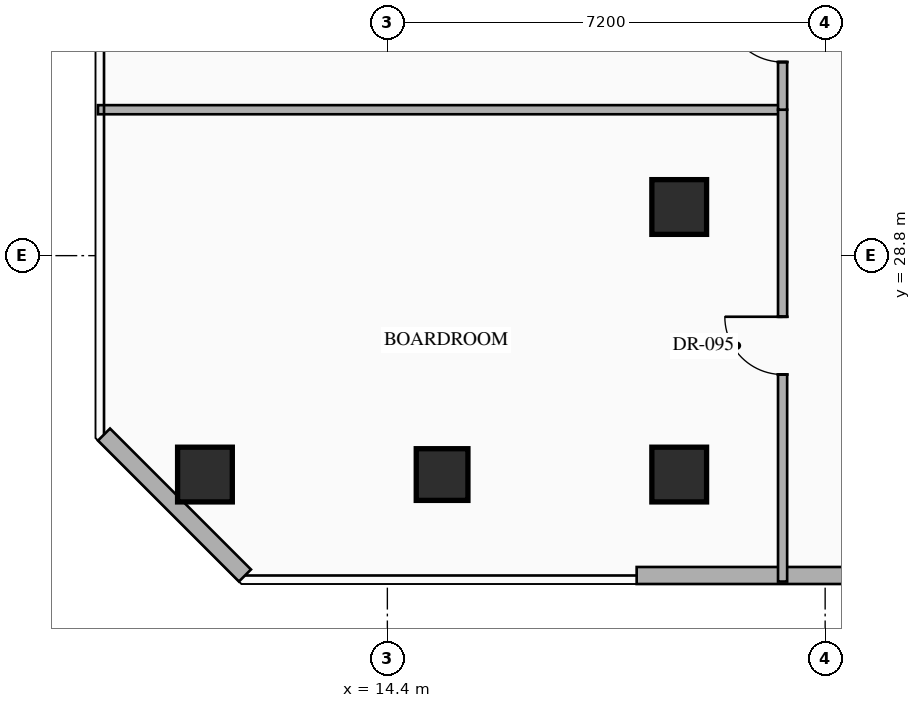
"""IFC4 building model, lengths in metres.
Left out: names, types, materials, properties, quantities, classifications, styles, units other than length and angle.
Written with IfcOpenShell. Run it as: python <this file> out.ifc"""

import sys

from ifc_helpers import new_model, si_unit, direction, frame, frame_2d, origin, origin_2d, place, context, subcontext, project, spatial, rectangle, hollow_rectangle, extrude, element, fill, save


model = new_model("IFC4")
c1 = context("Model", 3, precision=1e-05, world=origin(), true_north=direction((0.0, 1.0)))
c2 = subcontext(c1, "Body", "Model", "MODEL_VIEW")
j1 = project(units=[si_unit("LENGTHUNIT", "METRE"), si_unit("PLANEANGLEUNIT", "RADIAN")], contexts=[c1])
p1 = place(None, origin())
s1 = spatial("IfcSite", under=j1, at=p1, CompositionType="ELEMENT")
p2 = place(p1, origin())
s2 = spatial("IfcBuilding", under=s1, at=p2, CompositionType="ELEMENT")
p3 = place(p2, frame((0.0, 0.0, 119.25)))
s3 = spatial("IfcBuildingStorey", under=s2, at=p3, CompositionType="ELEMENT", Elevation=119.25)
for number, where, z_axis, x_axis in (
    (1, (11.4, 25.2, 0.0), (0.0, 0.0, 1.0), (1.0, 0.0, 0.0)),
    (2, (19.2, 25.2, 0.0), (0.0, 0.0, 1.0), (1.0, 0.0, 0.0)),
    (3, (19.2, 29.6, 0.0), (0.0, 0.0, 1.0), (1.0, 0.0, 0.0)),
):
    element("IfcColumn", number, at=place(p3, frame(where, z_axis=z_axis, x_axis=x_axis)), inside=s3, PredefinedType="COLUMN", context=c2, shape_type="SweptSolid", body=[
        extrude(hollow_rectangle(XDim=0.9, YDim=0.9, WallThickness=0.036, at=origin_2d()), origin(), (0.0, 0.0, 1.0), 3.6),
    ])
p4 = place(p3, frame((15.3, 25.2, 0.0), z_axis=(0.0, 0.0, 1.0), x_axis=(1.0, 0.0, 0.0)))
e4 = element("IfcColumn", 4, at=p4, inside=s3, PredefinedType="COLUMN", context=c2, shape_type="SweptSolid", body=[
    extrude(hollow_rectangle(XDim=0.85, YDim=0.85, WallThickness=0.032, at=origin_2d()), origin(), (0.0, 0.0, 1.0), 3.6),
])
p5 = place(p3, frame((25.247, 23.54, 0.0), z_axis=(0.0, 0.0, 1.0), x_axis=(-1.0, 0.0, 0.0)))
e5 = element("IfcWall", 5, at=p5, inside=s3, PredefinedType="STANDARD", context=c2, shape_type="SweptSolid", body=[
    extrude(rectangle(XDim=6.747, YDim=0.28, at=frame_2d((3.374, 0.0))), origin(), (0.0, 0.0, 1.0), 3.35),
])
p6 = place(p3, frame((12.058, 23.54, 0.0), z_axis=(0.0, 0.0, 1.0), x_axis=(-0.707144017911, 0.707069542501, 0.0)))
e6 = element("IfcWall", 6, at=p6, inside=s3, PredefinedType="STANDARD", context=c2, shape_type="SweptSolid", body=[
    extrude(rectangle(XDim=3.278, YDim=0.28, at=frame_2d((1.639, 0.0))), origin(), (0.0, 0.0, 1.0), 3.35),
])
p7 = place(p3, frame((9.64, 31.2, 0.0), z_axis=(0.0, 0.0, 1.0), x_axis=(1.0, 0.0, 0.0)))
e7 = element("IfcWall", 7, at=p7, inside=s3, PredefinedType="PARTITIONING", context=c2, shape_type="SweptSolid", body=[
    extrude(rectangle(XDim=11.26, YDim=0.15, at=frame_2d((5.63, 0.0))), origin(), (0.0, 0.0, 1.0), 3.35),
])
p8 = place(p3, frame((20.9, 23.44, 0.0), z_axis=(0.0, 0.0, 1.0), x_axis=(0.0, 1.0, 0.0)))
e8 = element("IfcWall", 8, at=p8, inside=s3, PredefinedType="PARTITIONING", context=c2, shape_type="SweptSolid", body=[
    extrude(rectangle(XDim=7.76, YDim=0.15, at=frame_2d((3.88, 0.0))), origin(), (0.0, 0.0, 1.0), 3.35),
])
p9 = place(p8, frame((3.405, 0.0, 0.0)))
e9 = element("IfcOpeningElement", 9, at=p9, cuts=e8, PredefinedType="OPENING", context=c2, shape_type="SweptSolid", body=[
    extrude(rectangle(XDim=0.95, YDim=2.15, at=frame_2d((0.475, 1.075))), frame((0.0, 0.085, 0.0), z_axis=(0.0, -1.0, 0.0), x_axis=(1.0, 0.0, 0.0)), (0.0, 0.0, 1.0), 0.17),
])
p10 = place(p3, frame((20.9, 31.2, 0.0), z_axis=(0.0, 0.0, 1.0), x_axis=(0.0, 1.0, 0.0)))
e10 = element("IfcWall", 10, at=p10, inside=s3, PredefinedType="PARTITIONING", context=c2, shape_type="SweptSolid", body=[
    extrude(rectangle(XDim=9.8, YDim=0.15, at=frame_2d((4.9, 0.0))), origin(), (0.0, 0.0, 1.0), 3.35),
])
p11 = place(p10, frame((0.784, 0.0, 0.0)))
e11 = element("IfcOpeningElement", 11, at=p11, cuts=e10, PredefinedType="OPENING", context=c2, shape_type="SweptSolid", body=[
    extrude(rectangle(XDim=0.95, YDim=2.15, at=frame_2d((0.475, 1.075))), frame((0.0, 0.085, 0.0), z_axis=(0.0, -1.0, 0.0), x_axis=(1.0, 0.0, 0.0)), (0.0, 0.0, 1.0), 0.17),
])
p12 = place(p9, origin())
e12 = element("IfcDoor", 12, at=p12, inside=s3, OperationType="SINGLE_SWING_RIGHT", PredefinedType="DOOR", context=c2, shape_type="SweptSolid", body=[
    extrude(rectangle(XDim=0.95, YDim=2.15, at=frame_2d((0.475, 1.075))), frame((0.0, 0.025, 0.0), z_axis=(0.0, -1.0, 0.0), x_axis=(1.0, 0.0, 0.0)), (0.0, 0.0, 1.0), 0.05),
])
fill(e9, e12)
p13 = place(p11, origin())
e13 = element("IfcDoor", 13, at=p13, inside=s3, OperationType="SINGLE_SWING_RIGHT", PredefinedType="DOOR", context=c2, shape_type="SweptSolid", body=[
    extrude(rectangle(XDim=0.95, YDim=2.15, at=frame_2d((0.475, 1.075))), frame((0.0, 0.025, 0.0), z_axis=(0.0, -1.0, 0.0), x_axis=(1.0, 0.0, 0.0)), (0.0, 0.0, 1.0), 0.05),
])
fill(e11, e13)
save(model, sys.argv[1])
